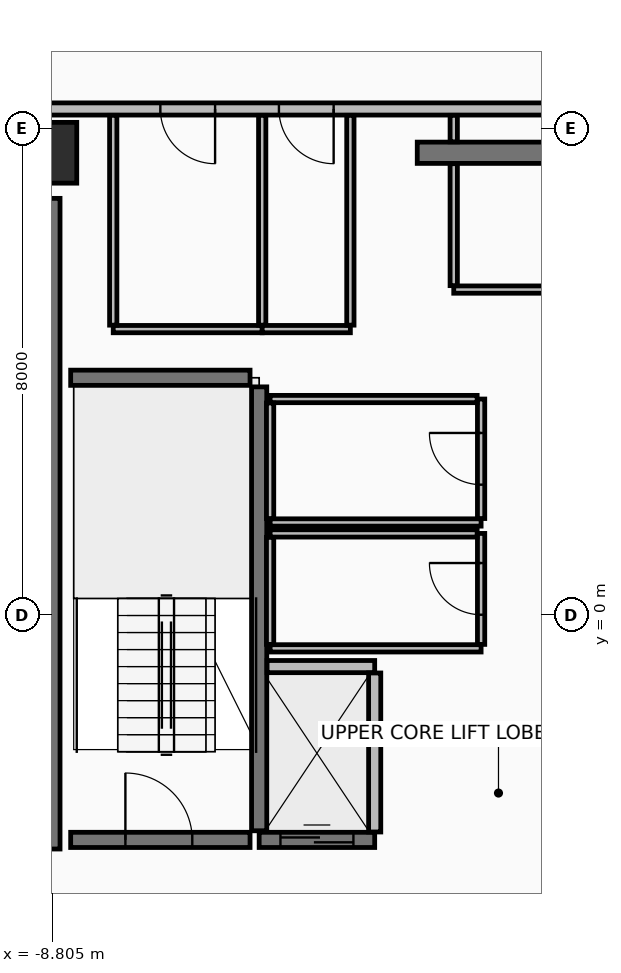
"""IFC4 building model, lengths in metres.
Left out: names, types, materials, properties, quantities, classifications, styles, units other than length and angle.
Written with IfcOpenShell. Run it as: python <this file> out.ifc"""

import sys

from ifc_helpers import new_model, si_unit, direction, frame, frame_2d, origin, origin_2d, place, context, subcontext, project, spatial, rectangle, extrude, element, fill, save


model = new_model("IFC4")
c1 = context("Model", 3, precision=1e-05, world=origin(), true_north=direction((0.0, 1.0)))
c2 = subcontext(c1, "Body", "Model", "MODEL_VIEW")
j1 = project(units=[si_unit("LENGTHUNIT", "METRE"), si_unit("PLANEANGLEUNIT", "RADIAN")], contexts=[c1])
p1 = place(None, origin())
s1 = spatial("IfcSite", under=j1, at=p1, CompositionType="ELEMENT")
p2 = place(p1, origin())
s2 = spatial("IfcBuilding", under=s1, at=p2, CompositionType="ELEMENT")
p3 = place(p2, frame((0.0, 0.0, 237.85)))
s3 = spatial("IfcBuildingStorey", under=s2, at=p3, CompositionType="ELEMENT", Elevation=237.85)
p4 = place(p3, frame((-8.9, 7.6, 0.0), z_axis=(0.0, 0.0, 1.0), x_axis=(1.0, 0.0, 0.0)))
e1 = element("IfcColumn", 1, at=p4, inside=s3, PredefinedType="COLUMN", context=c2, shape_type="SweptSolid", body=[
    extrude(rectangle(XDim=1.0, YDim=1.0, at=origin_2d()), origin(), (0.0, 0.0, 1.0), 3.6),
])
p5 = place(p3, frame((-2.8, 7.6, 0.0), z_axis=(0.0, 0.0, 1.0), x_axis=(1.0, 0.0, 0.0)))
e2 = element("IfcWall", 2, at=p5, inside=s3, PredefinedType="SHEAR", context=c2, shape_type="SweptSolid", body=[
    extrude(rectangle(XDim=5.38, YDim=0.35, at=frame_2d((2.69, 0.0))), origin(), (0.0, 0.0, 1.0), 3.42),
])
p6 = place(p3, frame((-8.9, -3.85, 0.0), z_axis=(0.0, 0.0, 1.0), x_axis=(0.0, 1.0, 0.0)))
e3 = element("IfcWall", 3, at=p6, inside=s3, PredefinedType="SHEAR", context=c2, shape_type="SweptSolid", body=[
    extrude(rectangle(XDim=10.7, YDim=0.45, at=frame_2d((5.35, 0.0))), origin(), (0.0, 0.0, 1.0), 3.42),
])
p7 = place(p3, frame((9.62, 8.32, 0.0), z_axis=(0.0, 0.0, 1.0), x_axis=(-1.0, 0.0, 0.0)))
e4 = element("IfcWall", 4, at=p7, inside=s3, PredefinedType="PARTITIONING", context=c2, shape_type="SweptSolid", body=[
    extrude(rectangle(XDim=19.24, YDim=0.2, at=frame_2d((9.62, 0.0))), origin(), (0.0, 0.0, 1.0), 2.915),
])
p8 = place(p7, frame((8.67, 0.0, 0.0)))
e5 = element("IfcOpeningElement", 5, at=p8, cuts=e4, PredefinedType="OPENING", context=c2, shape_type="SweptSolid", body=[
    extrude(rectangle(XDim=0.9, YDim=2.1, at=frame_2d((0.45, 1.05))), frame((0.0, 0.11, 0.0), z_axis=(0.0, -1.0, 0.0), x_axis=(1.0, 0.0, 0.0)), (0.0, 0.0, 1.0), 0.22),
])
p9 = place(p7, frame((15.745, 0.0, 0.0)))
e6 = element("IfcOpeningElement", 6, at=p9, cuts=e4, PredefinedType="OPENING", context=c2, shape_type="SweptSolid", body=[
    extrude(rectangle(XDim=0.9, YDim=2.1, at=frame_2d((0.45, 1.05))), frame((0.0, 0.11, 0.0), z_axis=(0.0, -1.0, 0.0), x_axis=(1.0, 0.0, 0.0)), (0.0, 0.0, 1.0), 0.22),
])
p10 = place(p7, frame((13.795, 0.0, 0.0)))
e7 = element("IfcOpeningElement", 7, at=p10, cuts=e4, PredefinedType="OPENING", context=c2, shape_type="SweptSolid", body=[
    extrude(rectangle(XDim=0.9, YDim=2.1, at=frame_2d((0.45, 1.05))), frame((0.0, 0.11, 0.0), z_axis=(0.0, -1.0, 0.0), x_axis=(1.0, 0.0, 0.0)), (0.0, 0.0, 1.0), 0.22),
])
p11 = place(p3, frame((-5.4, -3.55, 0.0), z_axis=(0.0, 0.0, 1.0), x_axis=(0.0, 1.0, 0.0)))
e8 = element("IfcWall", 8, at=p11, inside=s3, PredefinedType="SHEAR", context=c2, shape_type="SweptSolid", body=[
    extrude(rectangle(XDim=7.3, YDim=0.25, at=frame_2d((3.65, 0.0))), origin(), (0.0, 0.0, 1.0), 3.42),
])
p12 = place(p3, frame((-8.5, -3.7, 0.0), z_axis=(0.0, 0.0, 1.0), x_axis=(1.0, 0.0, 0.0)))
e9 = element("IfcWall", 9, at=p12, inside=s3, PredefinedType="SHEAR", context=c2, shape_type="SweptSolid", body=[
    extrude(rectangle(XDim=2.95, YDim=0.25, at=frame_2d((1.475, 0.0))), origin(), (0.0, 0.0, 1.0), 3.42),
])
p13 = place(p12, frame((0.9, 0.0, 0.0)))
e10 = element("IfcOpeningElement", 10, at=p13, cuts=e9, PredefinedType="OPENING", context=c2, shape_type="SweptSolid", body=[
    extrude(rectangle(XDim=1.1, YDim=2.15, at=frame_2d((0.55, 1.075))), frame((0.0, 0.135, 0.0), z_axis=(0.0, -1.0, 0.0), x_axis=(1.0, 0.0, 0.0)), (0.0, 0.0, 1.0), 0.27),
])
p14 = place(p3, frame((-8.5, 3.9, 0.0), z_axis=(0.0, 0.0, 1.0), x_axis=(1.0, 0.0, 0.0)))
e11 = element("IfcWall", 11, at=p14, inside=s3, PredefinedType="SHEAR", context=c2, shape_type="SweptSolid", body=[
    extrude(rectangle(XDim=2.95, YDim=0.25, at=frame_2d((1.475, 0.0))), origin(), (0.0, 0.0, 1.0), 3.42),
])
p15 = place(p3, frame((-5.4, -3.7, 0.0), z_axis=(0.0, 0.0, 1.0), x_axis=(1.0, 0.0, 0.0)))
e12 = element("IfcWall", 12, at=p15, inside=s3, PredefinedType="SHEAR", context=c2, shape_type="SweptSolid", body=[
    extrude(rectangle(XDim=1.9, YDim=0.25, at=frame_2d((0.95, 0.0))), origin(), (0.0, 0.0, 1.0), 3.42),
])
p16 = place(p15, frame((0.35, 0.0, 0.0)))
e13 = element("IfcOpeningElement", 13, at=p16, cuts=e12, PredefinedType="OPENING", context=c2, shape_type="SweptSolid", body=[
    extrude(rectangle(XDim=1.2, YDim=2.2, at=frame_2d((0.6, 1.1))), frame((0.0, 0.135, 0.0), z_axis=(0.0, -1.0, 0.0), x_axis=(1.0, 0.0, 0.0)), (0.0, 0.0, 1.0), 0.27),
])
p17 = place(p3, frame((-5.27, -0.85, 0.0), z_axis=(0.0, 0.0, 1.0), x_axis=(1.0, 0.0, 0.0)))
e14 = element("IfcWall", 14, at=p17, inside=s3, PredefinedType="PARTITIONING", context=c2, shape_type="SweptSolid", body=[
    extrude(rectangle(XDim=1.77, YDim=0.2, at=frame_2d((0.885, 0.0))), origin(), (0.0, 0.0, 1.0), 3.42),
])
p18 = place(p3, frame((-3.5, -3.57, 0.0), z_axis=(0.0, 0.0, 1.0), x_axis=(0.0, 1.0, 0.0)))
e15 = element("IfcWall", 15, at=p18, inside=s3, PredefinedType="PARTITIONING", context=c2, shape_type="SweptSolid", body=[
    extrude(rectangle(XDim=2.615, YDim=0.2, at=frame_2d((1.308, 0.0))), origin(), (0.0, 0.0, 1.0), 3.42),
])
p19 = place(p3, frame((-5.22, 1.52, 0.0), z_axis=(0.0, 0.0, 1.0), x_axis=(1.0, 0.0, 0.0)))
e16 = element("IfcWall", 16, at=p19, inside=s3, PredefinedType="PARTITIONING", context=c2, shape_type="SweptSolid", body=[
    extrude(rectangle(XDim=3.47, YDim=0.12, at=frame_2d((1.735, 0.0))), origin(), (0.0, 0.0, 1.0), 3.42),
])
p20 = place(p3, frame((-1.75, 1.585, 0.0), z_axis=(0.0, 0.0, 1.0), x_axis=(0.0, 1.0, 0.0)))
e17 = element("IfcWall", 17, at=p20, inside=s3, PredefinedType="PARTITIONING", context=c2, shape_type="SweptSolid", body=[
    extrude(rectangle(XDim=1.965, YDim=0.12, at=frame_2d((0.982, 0.0))), origin(), (0.0, 0.0, 1.0), 3.42),
])
p21 = place(p20, frame((0.557, 0.0, 0.0)))
e18 = element("IfcOpeningElement", 18, at=p21, cuts=e17, PredefinedType="OPENING", context=c2, shape_type="SweptSolid", body=[
    extrude(rectangle(XDim=0.85, YDim=2.1, at=frame_2d((0.425, 1.05))), frame((0.0, 0.07, 0.0), z_axis=(0.0, -1.0, 0.0), x_axis=(1.0, 0.0, 0.0)), (0.0, 0.0, 1.0), 0.14),
])
p22 = place(p3, frame((-1.815, 3.55, 0.0), z_axis=(0.0, 0.0, 1.0), x_axis=(-1.0, 0.0, 0.0)))
e19 = element("IfcWall", 19, at=p22, inside=s3, PredefinedType="PARTITIONING", context=c2, shape_type="SweptSolid", body=[
    extrude(rectangle(XDim=3.405, YDim=0.12, at=frame_2d((1.703, 0.0))), origin(), (0.0, 0.0, 1.0), 3.42),
])
p23 = place(p3, frame((-5.22, 3.485, 0.0), z_axis=(0.0, 0.0, 1.0), x_axis=(0.0, -1.0, 0.0)))
e20 = element("IfcWall", 20, at=p23, inside=s3, PredefinedType="PARTITIONING", context=c2, shape_type="SweptSolid", body=[
    extrude(rectangle(XDim=1.9, YDim=0.12, at=frame_2d((0.95, 0.0))), origin(), (0.0, 0.0, 1.0), 3.42),
])
p24 = place(p3, frame((-5.22, -0.55, 0.0), z_axis=(0.0, 0.0, 1.0), x_axis=(1.0, 0.0, 0.0)))
e21 = element("IfcWall", 21, at=p24, inside=s3, PredefinedType="PARTITIONING", context=c2, shape_type="SweptSolid", body=[
    extrude(rectangle(XDim=3.47, YDim=0.12, at=frame_2d((1.735, 0.0))), origin(), (0.0, 0.0, 1.0), 3.42),
])
p25 = place(p3, frame((-1.75, -0.485, 0.0), z_axis=(0.0, 0.0, 1.0), x_axis=(0.0, 1.0, 0.0)))
e22 = element("IfcWall", 22, at=p25, inside=s3, PredefinedType="PARTITIONING", context=c2, shape_type="SweptSolid", body=[
    extrude(rectangle(XDim=1.825, YDim=0.12, at=frame_2d((0.913, 0.0))), origin(), (0.0, 0.0, 1.0), 3.42),
])
p26 = place(p25, frame((0.488, 0.0, 0.0)))
e23 = element("IfcOpeningElement", 23, at=p26, cuts=e22, PredefinedType="OPENING", context=c2, shape_type="SweptSolid", body=[
    extrude(rectangle(XDim=0.85, YDim=2.1, at=frame_2d((0.425, 1.05))), frame((0.0, 0.07, 0.0), z_axis=(0.0, -1.0, 0.0), x_axis=(1.0, 0.0, 0.0)), (0.0, 0.0, 1.0), 0.14),
])
p27 = place(p3, frame((-1.815, 1.34, 0.0), z_axis=(0.0, 0.0, 1.0), x_axis=(-1.0, 0.0, 0.0)))
e24 = element("IfcWall", 24, at=p27, inside=s3, PredefinedType="PARTITIONING", context=c2, shape_type="SweptSolid", body=[
    extrude(rectangle(XDim=3.405, YDim=0.12, at=frame_2d((1.703, 0.0))), origin(), (0.0, 0.0, 1.0), 3.42),
])
p28 = place(p3, frame((-5.22, 1.275, 0.0), z_axis=(0.0, 0.0, 1.0), x_axis=(0.0, -1.0, 0.0)))
e25 = element("IfcWall", 25, at=p28, inside=s3, PredefinedType="PARTITIONING", context=c2, shape_type="SweptSolid", body=[
    extrude(rectangle(XDim=1.76, YDim=0.12, at=frame_2d((0.88, 0.0))), origin(), (0.0, 0.0, 1.0), 3.42),
])
p29 = place(p3, frame((-2.2, 5.35, 0.0), z_axis=(0.0, 0.0, 1.0), x_axis=(1.0, 0.0, 0.0)))
e26 = element("IfcWall", 26, at=p29, inside=s3, PredefinedType="PARTITIONING", context=c2, shape_type="SweptSolid", body=[
    extrude(rectangle(XDim=5.4, YDim=0.12, at=frame_2d((2.7, 0.0))), origin(), (0.0, 0.0, 1.0), 2.715),
])
p30 = place(p3, frame((-2.2, 8.215, 0.0), z_axis=(0.0, 0.0, 1.0), x_axis=(0.0, -1.0, 0.0)))
e27 = element("IfcWall", 27, at=p30, inside=s3, PredefinedType="PARTITIONING", context=c2, shape_type="SweptSolid", body=[
    extrude(rectangle(XDim=0.435, YDim=0.12, at=frame_2d((0.218, 0.0))), origin(), (0.0, 0.0, 1.0), 2.715),
])
p31 = place(p3, frame((-2.2, 7.42, 0.0), z_axis=(0.0, 0.0, 1.0), x_axis=(0.0, -1.0, 0.0)))
e28 = element("IfcWall", 28, at=p31, inside=s3, PredefinedType="PARTITIONING", context=c2, shape_type="SweptSolid", body=[
    extrude(rectangle(XDim=2.005, YDim=0.12, at=frame_2d((1.002, 0.0))), origin(), (0.0, 0.0, 1.0), 2.715),
])
p32 = place(p3, frame((-7.8, 4.7, 0.0), z_axis=(0.0, 0.0, 1.0), x_axis=(1.0, 0.0, 0.0)))
e29 = element("IfcWall", 29, at=p32, inside=s3, PredefinedType="PARTITIONING", context=c2, shape_type="SweptSolid", body=[
    extrude(rectangle(XDim=2.45, YDim=0.12, at=frame_2d((1.225, 0.0))), origin(), (0.0, 0.0, 1.0), 3.42),
])
for number, where, z_axis, x_axis in (
    (30, (-5.35, 4.765, 0.0), (0.0, 0.0, 1.0), (0.0, 1.0, 0.0)),
    (31, (-7.8, 8.215, 0.0), (0.0, 0.0, 1.0), (0.0, -1.0, 0.0)),
):
    element("IfcWall", number, at=place(p3, frame(where, z_axis=z_axis, x_axis=x_axis)), inside=s3, PredefinedType="PARTITIONING", context=c2, shape_type="SweptSolid", body=[
        extrude(rectangle(XDim=3.45, YDim=0.12, at=frame_2d((1.725, 0.0))), origin(), (0.0, 0.0, 1.0), 2.715),
    ])
p33 = place(p3, frame((-5.35, 4.7, 0.0), z_axis=(0.0, 0.0, 1.0), x_axis=(1.0, 0.0, 0.0)))
e32 = element("IfcWall", 32, at=p33, inside=s3, PredefinedType="PARTITIONING", context=c2, shape_type="SweptSolid", body=[
    extrude(rectangle(XDim=1.45, YDim=0.12, at=frame_2d((0.725, 0.0))), origin(), (0.0, 0.0, 1.0), 3.42),
])
p34 = place(p3, frame((-3.9, 4.765, 0.0), z_axis=(0.0, 0.0, 1.0), x_axis=(0.0, 1.0, 0.0)))
e33 = element("IfcWall", 33, at=p34, inside=s3, PredefinedType="PARTITIONING", context=c2, shape_type="SweptSolid", body=[
    extrude(rectangle(XDim=3.45, YDim=0.12, at=frame_2d((1.725, 0.0))), origin(), (0.0, 0.0, 1.0), 2.715),
])
p35 = place(p13, origin())
e34 = element("IfcDoor", 34, at=p35, inside=s3, OperationType="SINGLE_SWING_LEFT", PredefinedType="DOOR", context=c2, shape_type="SweptSolid", body=[
    extrude(rectangle(XDim=1.1, YDim=2.15, at=frame_2d((0.55, 1.075))), frame((0.0, 0.025, 0.0), z_axis=(0.0, -1.0, 0.0), x_axis=(1.0, 0.0, 0.0)), (0.0, 0.0, 1.0), 0.05),
])
fill(e10, e34)
p36 = place(p16, origin())
e35 = element("IfcDoor", 35, at=p36, inside=s3, OperationType="SLIDING_TO_RIGHT", PredefinedType="DOOR", context=c2, shape_type="SweptSolid", body=[
    extrude(rectangle(XDim=1.2, YDim=2.2, at=frame_2d((0.6, 1.1))), frame((0.0, 0.025, 0.0), z_axis=(0.0, -1.0, 0.0), x_axis=(1.0, 0.0, 0.0)), (0.0, 0.0, 1.0), 0.05),
])
fill(e13, e35)
p37 = place(p21, frame((0.85, 0.0, 0.0), z_axis=(0.0, 0.0, 1.0), x_axis=(-1.0, 0.0, 0.0)))
e36 = element("IfcDoor", 36, at=p37, inside=s3, OperationType="SINGLE_SWING_RIGHT", PredefinedType="DOOR", context=c2, shape_type="SweptSolid", body=[
    extrude(rectangle(XDim=0.85, YDim=2.1, at=frame_2d((0.425, 1.05))), frame((0.0, 0.025, 0.0), z_axis=(0.0, -1.0, 0.0), x_axis=(1.0, 0.0, 0.0)), (0.0, 0.0, 1.0), 0.05),
])
fill(e18, e36)
p38 = place(p26, frame((0.85, 0.0, 0.0), z_axis=(0.0, 0.0, 1.0), x_axis=(-1.0, 0.0, 0.0)))
e37 = element("IfcDoor", 37, at=p38, inside=s3, OperationType="SINGLE_SWING_RIGHT", PredefinedType="DOOR", context=c2, shape_type="SweptSolid", body=[
    extrude(rectangle(XDim=0.85, YDim=2.1, at=frame_2d((0.425, 1.05))), frame((0.0, 0.025, 0.0), z_axis=(0.0, -1.0, 0.0), x_axis=(1.0, 0.0, 0.0)), (0.0, 0.0, 1.0), 0.05),
])
fill(e23, e37)
p39 = place(p9, origin())
e38 = element("IfcDoor", 38, at=p39, inside=s3, OperationType="SINGLE_SWING_LEFT", PredefinedType="DOOR", context=c2, shape_type="SweptSolid", body=[
    extrude(rectangle(XDim=0.9, YDim=2.1, at=frame_2d((0.45, 1.05))), frame((0.0, 0.025, 0.0), z_axis=(0.0, -1.0, 0.0), x_axis=(1.0, 0.0, 0.0)), (0.0, 0.0, 1.0), 0.05),
])
fill(e6, e38)
p40 = place(p10, origin())
e39 = element("IfcDoor", 39, at=p40, inside=s3, OperationType="SINGLE_SWING_LEFT", PredefinedType="DOOR", context=c2, shape_type="SweptSolid", body=[
    extrude(rectangle(XDim=0.9, YDim=2.1, at=frame_2d((0.45, 1.05))), frame((0.0, 0.025, 0.0), z_axis=(0.0, -1.0, 0.0), x_axis=(1.0, 0.0, 0.0)), (0.0, 0.0, 1.0), 0.05),
])
fill(e7, e39)
save(model, sys.argv[1])
